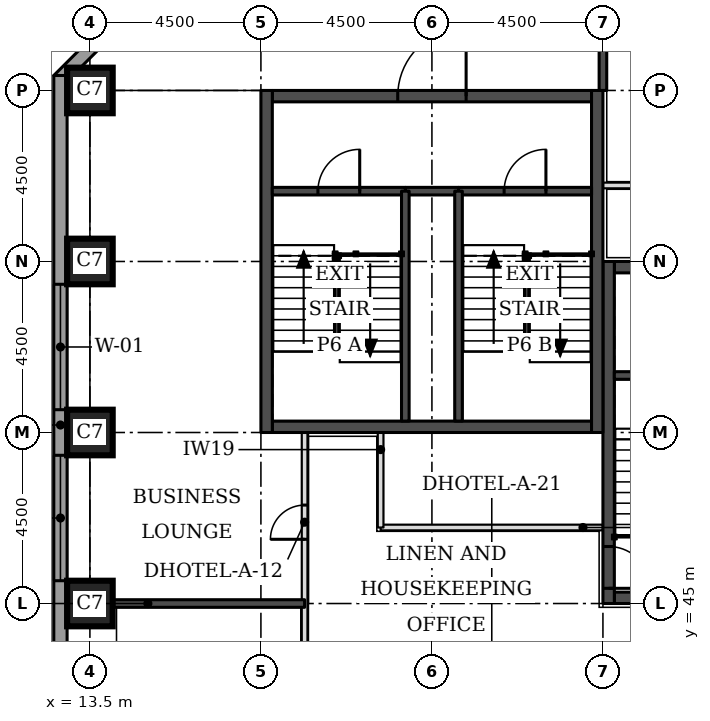
"""IFC4 building model, lengths in metres.
Left out: names, types, materials, properties, quantities, classifications, styles, units other than length and angle.
Written with IfcOpenShell. Run it as: python <this file> out.ifc"""

import sys

from ifc_helpers import new_model, si_unit, direction, frame, frame_2d, origin, origin_2d, place, context, subcontext, project, spatial, rectangle, extrude, element, fill, save


model = new_model("IFC4")
c1 = context("Model", 3, precision=1e-05, world=origin(), true_north=direction((0.0, 1.0)))
c2 = subcontext(c1, "Body", "Model", "MODEL_VIEW")
j1 = project(units=[si_unit("LENGTHUNIT", "METRE"), si_unit("PLANEANGLEUNIT", "RADIAN")], contexts=[c1])
p1 = place(None, origin())
s1 = spatial("IfcSite", under=j1, at=p1, CompositionType="ELEMENT")
p2 = place(p1, origin())
s2 = spatial("IfcBuilding", under=s1, at=p2, CompositionType="ELEMENT")
p3 = place(p2, frame((0.0, 0.0, 49.5)))
s3 = spatial("IfcBuildingStorey", under=s2, at=p3, CompositionType="ELEMENT", Elevation=49.5)
for number, where, z_axis, x_axis in (
    (1, (13.5, 45.0, 0.0), (0.0, 0.0, 1.0), (1.0, 0.0, 0.0)),
    (2, (13.5, 49.5, 0.0), (0.0, 0.0, 1.0), (1.0, 0.0, 0.0)),
    (3, (13.5, 54.0, 0.0), (0.0, 0.0, 1.0), (1.0, 0.0, 0.0)),
    (4, (13.5, 58.5, 0.0), (0.0, 0.0, 1.0), (1.0, 0.0, 0.0)),
):
    element("IfcColumn", number, at=place(p3, frame(where, z_axis=z_axis, x_axis=x_axis)), inside=s3, PredefinedType="COLUMN", context=c2, shape_type="SweptSolid", body=[
        extrude(rectangle(XDim=1.2, YDim=1.2, at=origin_2d()), origin(), (0.0, 0.0, 1.0), 3.3),
    ])
p4 = place(p3, frame((27.3, 45.15, 0.0), z_axis=(0.0, 0.0, 1.0), x_axis=(1.0, 0.0, 0.0)))
e5 = element("IfcWall", 5, at=p4, inside=s3, PredefinedType="SHEAR", context=c2, shape_type="SweptSolid", body=[
    extrude(rectangle(XDim=8.4, YDim=0.3, at=frame_2d((4.2, 0.0))), origin(), (0.0, 0.0, 1.0), 3.3),
])
p5 = place(p4, frame((5.2, 0.0, 0.0)))
e6 = element("IfcOpeningElement", 6, at=p5, cuts=e5, PredefinedType="OPENING", context=c2, shape_type="SweptSolid", body=[
    extrude(rectangle(XDim=1.0, YDim=2.1, at=frame_2d((0.5, 1.05))), frame((0.0, 0.16, 0.0), z_axis=(0.0, -1.0, 0.0), x_axis=(1.0, 0.0, 0.0)), (0.0, 0.0, 1.0), 0.32),
])
p6 = place(p3, frame((27.3, 53.85, 0.0), z_axis=(0.0, 0.0, 1.0), x_axis=(1.0, 0.0, 0.0)))
e7 = element("IfcWall", 7, at=p6, inside=s3, PredefinedType="SHEAR", context=c2, shape_type="SweptSolid", body=[
    extrude(rectangle(XDim=8.4, YDim=0.3, at=frame_2d((4.2, 0.0))), origin(), (0.0, 0.0, 1.0), 3.3),
])
p7 = place(p6, frame((6.4, 0.0, 0.0)))
e8 = element("IfcOpeningElement", 8, at=p7, cuts=e7, PredefinedType="OPENING", context=c2, shape_type="SweptSolid", body=[
    extrude(rectangle(XDim=1.1, YDim=2.1, at=frame_2d((0.55, 1.05))), frame((0.0, 0.16, 0.0), z_axis=(0.0, -1.0, 0.0), x_axis=(1.0, 0.0, 0.0)), (0.0, 0.0, 1.0), 0.32),
])
p8 = place(p3, frame((27.15, 45.0, 0.0), z_axis=(0.0, 0.0, 1.0), x_axis=(0.0, 1.0, 0.0)))
e9 = element("IfcWall", 9, at=p8, inside=s3, PredefinedType="SHEAR", context=c2, shape_type="SweptSolid", body=[
    extrude(rectangle(XDim=9.0, YDim=0.3, at=frame_2d((4.5, 0.0))), origin(), (0.0, 0.0, 1.0), 3.3),
])
p9 = place(p8, frame((0.4, 0.0, 0.0)))
e10 = element("IfcOpeningElement", 10, at=p9, cuts=e9, PredefinedType="OPENING", context=c2, shape_type="SweptSolid", body=[
    extrude(rectangle(XDim=1.1, YDim=2.1, at=frame_2d((0.55, 1.05))), frame((0.0, 0.16, 0.0), z_axis=(0.0, -1.0, 0.0), x_axis=(1.0, 0.0, 0.0)), (0.0, 0.0, 1.0), 0.32),
])
p10 = place(p3, frame((18.3, 49.65, 0.0), z_axis=(0.0, 0.0, 1.0), x_axis=(1.0, 0.0, 0.0)))
e11 = element("IfcWall", 11, at=p10, inside=s3, PredefinedType="SHEAR", context=c2, shape_type="SweptSolid", body=[
    extrude(rectangle(XDim=8.4, YDim=0.3, at=frame_2d((4.2, 0.0))), origin(), (0.0, 0.0, 1.0), 3.3),
])
p11 = place(p3, frame((18.3, 58.35, 0.0), z_axis=(0.0, 0.0, 1.0), x_axis=(1.0, 0.0, 0.0)))
e12 = element("IfcWall", 12, at=p11, inside=s3, PredefinedType="SHEAR", context=c2, shape_type="SweptSolid", body=[
    extrude(rectangle(XDim=8.4, YDim=0.3, at=frame_2d((4.2, 0.0))), origin(), (0.0, 0.0, 1.0), 3.3),
])
p12 = place(p11, frame((3.3, 0.0, 0.0)))
e13 = element("IfcOpeningElement", 13, at=p12, cuts=e12, PredefinedType="OPENING", context=c2, shape_type="SweptSolid", body=[
    extrude(rectangle(XDim=1.8, YDim=2.1, at=frame_2d((0.9, 1.05))), frame((0.0, 0.16, 0.0), z_axis=(0.0, -1.0, 0.0), x_axis=(1.0, 0.0, 0.0)), (0.0, 0.0, 1.0), 0.32),
])
for number, where, z_axis, x_axis in (
    (14, (18.15, 49.5, 0.0), (0.0, 0.0, 1.0), (0.0, 1.0, 0.0)),
    (15, (26.85, 49.5, 0.0), (0.0, 0.0, 1.0), (0.0, 1.0, 0.0)),
):
    element("IfcWall", number, at=place(p3, frame(where, z_axis=z_axis, x_axis=x_axis)), inside=s3, PredefinedType="SHEAR", context=c2, shape_type="SweptSolid", body=[
        extrude(rectangle(XDim=9.0, YDim=0.3, at=frame_2d((4.5, 0.0))), origin(), (0.0, 0.0, 1.0), 3.3),
    ])
p13 = place(p3, frame((17.73, 63.826, 0.0), z_axis=(0.0, 0.0, 1.0), x_axis=(-0.707106781187, -0.707106781187, 0.0)))
e16 = element("IfcWall", 16, at=p13, inside=s3, PredefinedType="STANDARD", context=c2, shape_type="SweptSolid", body=[
    extrude(rectangle(XDim=7.151, YDim=0.35, at=frame_2d((3.576, 0.0))), origin(), (0.0, 0.0, 1.0), 3.055),
])
p14 = place(p13, frame((1.926, 0.0, 0.8)))
e17 = element("IfcOpeningElement", 17, at=p14, cuts=e16, PredefinedType="OPENING", context=c2, shape_type="SweptSolid", body=[
    extrude(rectangle(XDim=3.3, YDim=1.5, at=frame_2d((1.65, 0.75))), frame((0.0, 0.185, 0.0), z_axis=(0.0, -1.0, 0.0), x_axis=(1.0, 0.0, 0.0)), (0.0, 0.0, 1.0), 0.37),
])
p15 = place(p3, frame((12.725, 58.894, 0.0), z_axis=(0.0, 0.0, 1.0), x_axis=(0.0, -1.0, 0.0)))
e18 = element("IfcWall", 18, at=p15, inside=s3, PredefinedType="STANDARD", context=c2, shape_type="SweptSolid", body=[
    extrude(rectangle(XDim=18.394, YDim=0.35, at=frame_2d((9.197, 0.0))), origin(), (0.0, 0.0, 1.0), 3.055),
])
p16 = place(p15, frame((5.493, 0.0, 0.8)))
e19 = element("IfcOpeningElement", 19, at=p16, cuts=e18, PredefinedType="OPENING", context=c2, shape_type="SweptSolid", body=[
    extrude(rectangle(XDim=3.3, YDim=1.5, at=frame_2d((1.65, 0.75))), frame((0.0, 0.185, 0.0), z_axis=(0.0, -1.0, 0.0), x_axis=(1.0, 0.0, 0.0)), (0.0, 0.0, 1.0), 0.37),
])
p17 = place(p15, frame((9.993, 0.0, 0.8)))
e20 = element("IfcOpeningElement", 20, at=p17, cuts=e18, PredefinedType="OPENING", context=c2, shape_type="SweptSolid", body=[
    extrude(rectangle(XDim=3.3, YDim=1.5, at=frame_2d((1.65, 0.75))), frame((0.0, 0.185, 0.0), z_axis=(0.0, -1.0, 0.0), x_axis=(1.0, 0.0, 0.0)), (0.0, 0.0, 1.0), 0.37),
])
p18 = place(p3, frame((19.15, 23.65, 0.0), z_axis=(0.0, 0.0, 1.0), x_axis=(0.0, 1.0, 0.0)))
e21 = element("IfcWall", 21, at=p18, inside=s3, PredefinedType="PARTITIONING", context=c2, shape_type="SweptSolid", body=[
    extrude(rectangle(XDim=25.85, YDim=0.15, at=frame_2d((12.925, 0.0))), origin(), (0.0, 0.0, 1.0), 3.08),
])
p19 = place(p18, frame((1.775, 0.0, 0.0)))
e22 = element("IfcOpeningElement", 22, at=p19, cuts=e21, PredefinedType="OPENING", context=c2, shape_type="SweptSolid", body=[
    extrude(rectangle(XDim=1.0, YDim=2.1, at=frame_2d((0.5, 1.05))), frame((0.0, 0.085, 0.0), z_axis=(0.0, -1.0, 0.0), x_axis=(1.0, 0.0, 0.0)), (0.0, 0.0, 1.0), 0.17),
])
p20 = place(p18, frame((6.125, 0.0, 0.0)))
e23 = element("IfcOpeningElement", 23, at=p20, cuts=e21, PredefinedType="OPENING", context=c2, shape_type="SweptSolid", body=[
    extrude(rectangle(XDim=1.0, YDim=2.1, at=frame_2d((0.5, 1.05))), frame((0.0, 0.085, 0.0), z_axis=(0.0, -1.0, 0.0), x_axis=(1.0, 0.0, 0.0)), (0.0, 0.0, 1.0), 0.17),
])
p21 = place(p18, frame((17.825, 0.0, 0.0)))
e24 = element("IfcOpeningElement", 24, at=p21, cuts=e21, PredefinedType="OPENING", context=c2, shape_type="SweptSolid", body=[
    extrude(rectangle(XDim=1.0, YDim=2.1, at=frame_2d((0.5, 1.05))), frame((0.0, 0.085, 0.0), z_axis=(0.0, -1.0, 0.0), x_axis=(1.0, 0.0, 0.0)), (0.0, 0.0, 1.0), 0.17),
])
p22 = place(p18, frame((23.04, 0.0, 0.0)))
e25 = element("IfcOpeningElement", 25, at=p22, cuts=e21, PredefinedType="OPENING", context=c2, shape_type="SweptSolid", body=[
    extrude(rectangle(XDim=0.9, YDim=2.1, at=frame_2d((0.45, 1.05))), frame((0.0, 0.085, 0.0), z_axis=(0.0, -1.0, 0.0), x_axis=(1.0, 0.0, 0.0)), (0.0, 0.0, 1.0), 0.17),
])
p23 = place(p3, frame((21.15, 47.0, 0.0), z_axis=(0.0, 0.0, 1.0), x_axis=(1.0, 0.0, 0.0)))
e26 = element("IfcWall", 26, at=p23, inside=s3, PredefinedType="PARTITIONING", context=c2, shape_type="SweptSolid", body=[
    extrude(rectangle(XDim=5.85, YDim=0.15, at=frame_2d((2.925, 0.0))), origin(), (0.0, 0.0, 1.0), 3.08),
])
p24 = place(p3, frame((21.15, 47.0, 0.0), z_axis=(0.0, 0.0, 1.0), x_axis=(0.0, 1.0, 0.0)))
e27 = element("IfcWall", 27, at=p24, inside=s3, PredefinedType="PARTITIONING", context=c2, shape_type="SweptSolid", body=[
    extrude(rectangle(XDim=2.5, YDim=0.15, at=frame_2d((1.25, 0.0))), origin(), (0.0, 0.0, 1.0), 3.08),
])
p25 = place(p3, frame((27.0, 56.0, 0.0), z_axis=(0.0, 0.0, 1.0), x_axis=(1.0, 0.0, 0.0)))
e28 = element("IfcWall", 28, at=p25, inside=s3, PredefinedType="PARTITIONING", context=c2, shape_type="SweptSolid", body=[
    extrude(rectangle(XDim=16.0, YDim=0.15, at=frame_2d((8.0, 0.0))), origin(), (0.0, 0.0, 1.0), 3.08),
])
p26 = place(p25, frame((2.775, 0.0, 0.0)))
e29 = element("IfcOpeningElement", 29, at=p26, cuts=e28, PredefinedType="OPENING", context=c2, shape_type="SweptSolid", body=[
    extrude(rectangle(XDim=1.0, YDim=2.1, at=frame_2d((0.5, 1.05))), frame((0.0, 0.085, 0.0), z_axis=(0.0, -1.0, 0.0), x_axis=(1.0, 0.0, 0.0)), (0.0, 0.0, 1.0), 0.17),
])
p27 = place(p3, frame((14.1, 45.0, 0.0), z_axis=(0.0, 0.0, 1.0), x_axis=(1.0, 0.0, 0.0)))
e30 = element("IfcWall", 30, at=p27, inside=s3, PredefinedType="SOLIDWALL", context=c2, shape_type="SweptSolid", body=[
    extrude(rectangle(XDim=5.05, YDim=0.2, at=frame_2d((2.525, 0.0))), origin(), (0.0, 0.0, 1.0), 3.08),
])
p28 = place(p3, frame((27.0, 58.5, 0.0), z_axis=(0.0, 0.0, 1.0), x_axis=(0.0, 1.0, 0.0)))
e31 = element("IfcWall", 31, at=p28, inside=s3, PredefinedType="SOLIDWALL", context=c2, shape_type="SweptSolid", body=[
    extrude(rectangle(XDim=3.9, YDim=0.2, at=frame_2d((1.95, 0.0))), origin(), (0.0, 0.0, 1.0), 3.08),
])
p29 = place(p3, frame((27.3, 51.0, 0.0), z_axis=(0.0, 0.0, 1.0), x_axis=(1.0, 0.0, 0.0)))
e32 = element("IfcWall", 32, at=p29, inside=s3, PredefinedType="SOLIDWALL", context=c2, shape_type="SweptSolid", body=[
    extrude(rectangle(XDim=3.0, YDim=0.2, at=frame_2d((1.5, 0.0))), origin(), (0.0, 0.0, 1.0), 3.08),
])
p30 = place(p3, frame((21.8, 55.85, 0.0), z_axis=(0.0, 0.0, 1.0), x_axis=(1.0, 0.0, 0.0)))
e33 = element("IfcWall", 33, at=p30, inside=s3, PredefinedType="SOLIDWALL", context=c2, shape_type="SweptSolid", body=[
    extrude(rectangle(XDim=1.4, YDim=0.2, at=frame_2d((0.7, 0.0))), origin(), (0.0, 0.0, 1.0), 3.08),
])
p31 = place(p3, frame((18.3, 55.85, 0.0), z_axis=(0.0, 0.0, 1.0), x_axis=(1.0, 0.0, 0.0)))
e34 = element("IfcWall", 34, at=p31, inside=s3, PredefinedType="SOLIDWALL", context=c2, shape_type="SweptSolid", body=[
    extrude(rectangle(XDim=3.5, YDim=0.2, at=frame_2d((1.75, 0.0))), origin(), (0.0, 0.0, 1.0), 3.08),
])
p32 = place(p31, frame((1.2, 0.0, 0.0)))
e35 = element("IfcOpeningElement", 35, at=p32, cuts=e34, PredefinedType="OPENING", context=c2, shape_type="SweptSolid", body=[
    extrude(rectangle(XDim=1.1, YDim=2.1, at=frame_2d((0.55, 1.05))), frame((0.0, 0.11, 0.0), z_axis=(0.0, -1.0, 0.0), x_axis=(1.0, 0.0, 0.0)), (0.0, 0.0, 1.0), 0.22),
])
p33 = place(p3, frame((23.2, 55.85, 0.0), z_axis=(0.0, 0.0, 1.0), x_axis=(1.0, 0.0, 0.0)))
e36 = element("IfcWall", 36, at=p33, inside=s3, PredefinedType="SOLIDWALL", context=c2, shape_type="SweptSolid", body=[
    extrude(rectangle(XDim=3.5, YDim=0.2, at=frame_2d((1.75, 0.0))), origin(), (0.0, 0.0, 1.0), 3.08),
])
p34 = place(p33, frame((1.2, 0.0, 0.0)))
e37 = element("IfcOpeningElement", 37, at=p34, cuts=e36, PredefinedType="OPENING", context=c2, shape_type="SweptSolid", body=[
    extrude(rectangle(XDim=1.1, YDim=2.1, at=frame_2d((0.55, 1.05))), frame((0.0, 0.11, 0.0), z_axis=(0.0, -1.0, 0.0), x_axis=(1.0, 0.0, 0.0)), (0.0, 0.0, 1.0), 0.22),
])
for number, where, z_axis, x_axis in (
    (38, (21.8, 49.8, 0.0), (0.0, 0.0, 1.0), (0.0, 1.0, 0.0)),
    (39, (23.2, 49.8, 0.0), (0.0, 0.0, 1.0), (0.0, 1.0, 0.0)),
):
    element("IfcWall", number, at=place(p3, frame(where, z_axis=z_axis, x_axis=x_axis)), inside=s3, PredefinedType="SOLIDWALL", context=c2, shape_type="SweptSolid", body=[
        extrude(rectangle(XDim=6.05, YDim=0.2, at=frame_2d((3.025, 0.0))), origin(), (0.0, 0.0, 1.0), 3.08),
    ])
p35 = place(p16, origin())
e40 = element("IfcWindow", 40, at=p35, inside=s3, PartitioningType="SINGLE_PANEL", PredefinedType="WINDOW", context=c2, shape_type="SweptSolid", body=[
    extrude(rectangle(XDim=3.3, YDim=1.5, at=frame_2d((1.65, 0.75))), frame((0.0, 0.085, 0.0), z_axis=(0.0, -1.0, 0.0), x_axis=(1.0, 0.0, 0.0)), (0.0, 0.0, 1.0), 0.06),
])
fill(e19, e40)
p36 = place(p17, origin())
e41 = element("IfcWindow", 41, at=p36, inside=s3, PartitioningType="SINGLE_PANEL", PredefinedType="WINDOW", context=c2, shape_type="SweptSolid", body=[
    extrude(rectangle(XDim=3.3, YDim=1.5, at=frame_2d((1.65, 0.75))), frame((0.0, 0.085, 0.0), z_axis=(0.0, -1.0, 0.0), x_axis=(1.0, 0.0, 0.0)), (0.0, 0.0, 1.0), 0.06),
])
fill(e20, e41)
p37 = place(p22, origin())
e42 = element("IfcDoor", 42, at=p37, inside=s3, OperationType="SINGLE_SWING_LEFT", PredefinedType="DOOR", context=c2, shape_type="SweptSolid", body=[
    extrude(rectangle(XDim=0.9, YDim=2.1, at=frame_2d((0.45, 1.05))), frame((0.0, 0.025, 0.0), z_axis=(0.0, -1.0, 0.0), x_axis=(1.0, 0.0, 0.0)), (0.0, 0.0, 1.0), 0.05),
])
fill(e25, e42)
p38 = place(p9, frame((1.1, 0.0, 0.0), z_axis=(0.0, 0.0, 1.0), x_axis=(-1.0, 0.0, 0.0)))
e43 = element("IfcDoor", 43, at=p38, inside=s3, OperationType="SINGLE_SWING_RIGHT", PredefinedType="DOOR", context=c2, shape_type="SweptSolid", body=[
    extrude(rectangle(XDim=1.1, YDim=2.1, at=frame_2d((0.55, 1.05))), frame((0.0, 0.025, 0.0), z_axis=(0.0, -1.0, 0.0), x_axis=(1.0, 0.0, 0.0)), (0.0, 0.0, 1.0), 0.05),
])
fill(e10, e43)
p39 = place(p32, origin())
e44 = element("IfcDoor", 44, at=p39, inside=s3, OperationType="SINGLE_SWING_RIGHT", PredefinedType="DOOR", context=c2, shape_type="SweptSolid", body=[
    extrude(rectangle(XDim=1.1, YDim=2.1, at=frame_2d((0.55, 1.05))), frame((0.0, 0.025, 0.0), z_axis=(0.0, -1.0, 0.0), x_axis=(1.0, 0.0, 0.0)), (0.0, 0.0, 1.0), 0.05),
])
fill(e35, e44)
p40 = place(p34, origin())
e45 = element("IfcDoor", 45, at=p40, inside=s3, OperationType="SINGLE_SWING_RIGHT", PredefinedType="DOOR", context=c2, shape_type="SweptSolid", body=[
    extrude(rectangle(XDim=1.1, YDim=2.1, at=frame_2d((0.55, 1.05))), frame((0.0, 0.025, 0.0), z_axis=(0.0, -1.0, 0.0), x_axis=(1.0, 0.0, 0.0)), (0.0, 0.0, 1.0), 0.05),
])
fill(e37, e45)
p41 = place(p12, origin())
e46 = element("IfcDoor", 46, at=p41, inside=s3, OperationType="SINGLE_SWING_RIGHT", PredefinedType="DOOR", context=c2, shape_type="SweptSolid", body=[
    extrude(rectangle(XDim=1.8, YDim=2.1, at=frame_2d((0.9, 1.05))), frame((0.0, 0.025, 0.0), z_axis=(0.0, -1.0, 0.0), x_axis=(1.0, 0.0, 0.0)), (0.0, 0.0, 1.0), 0.05),
])
fill(e13, e46)
save(model, sys.argv[1])
